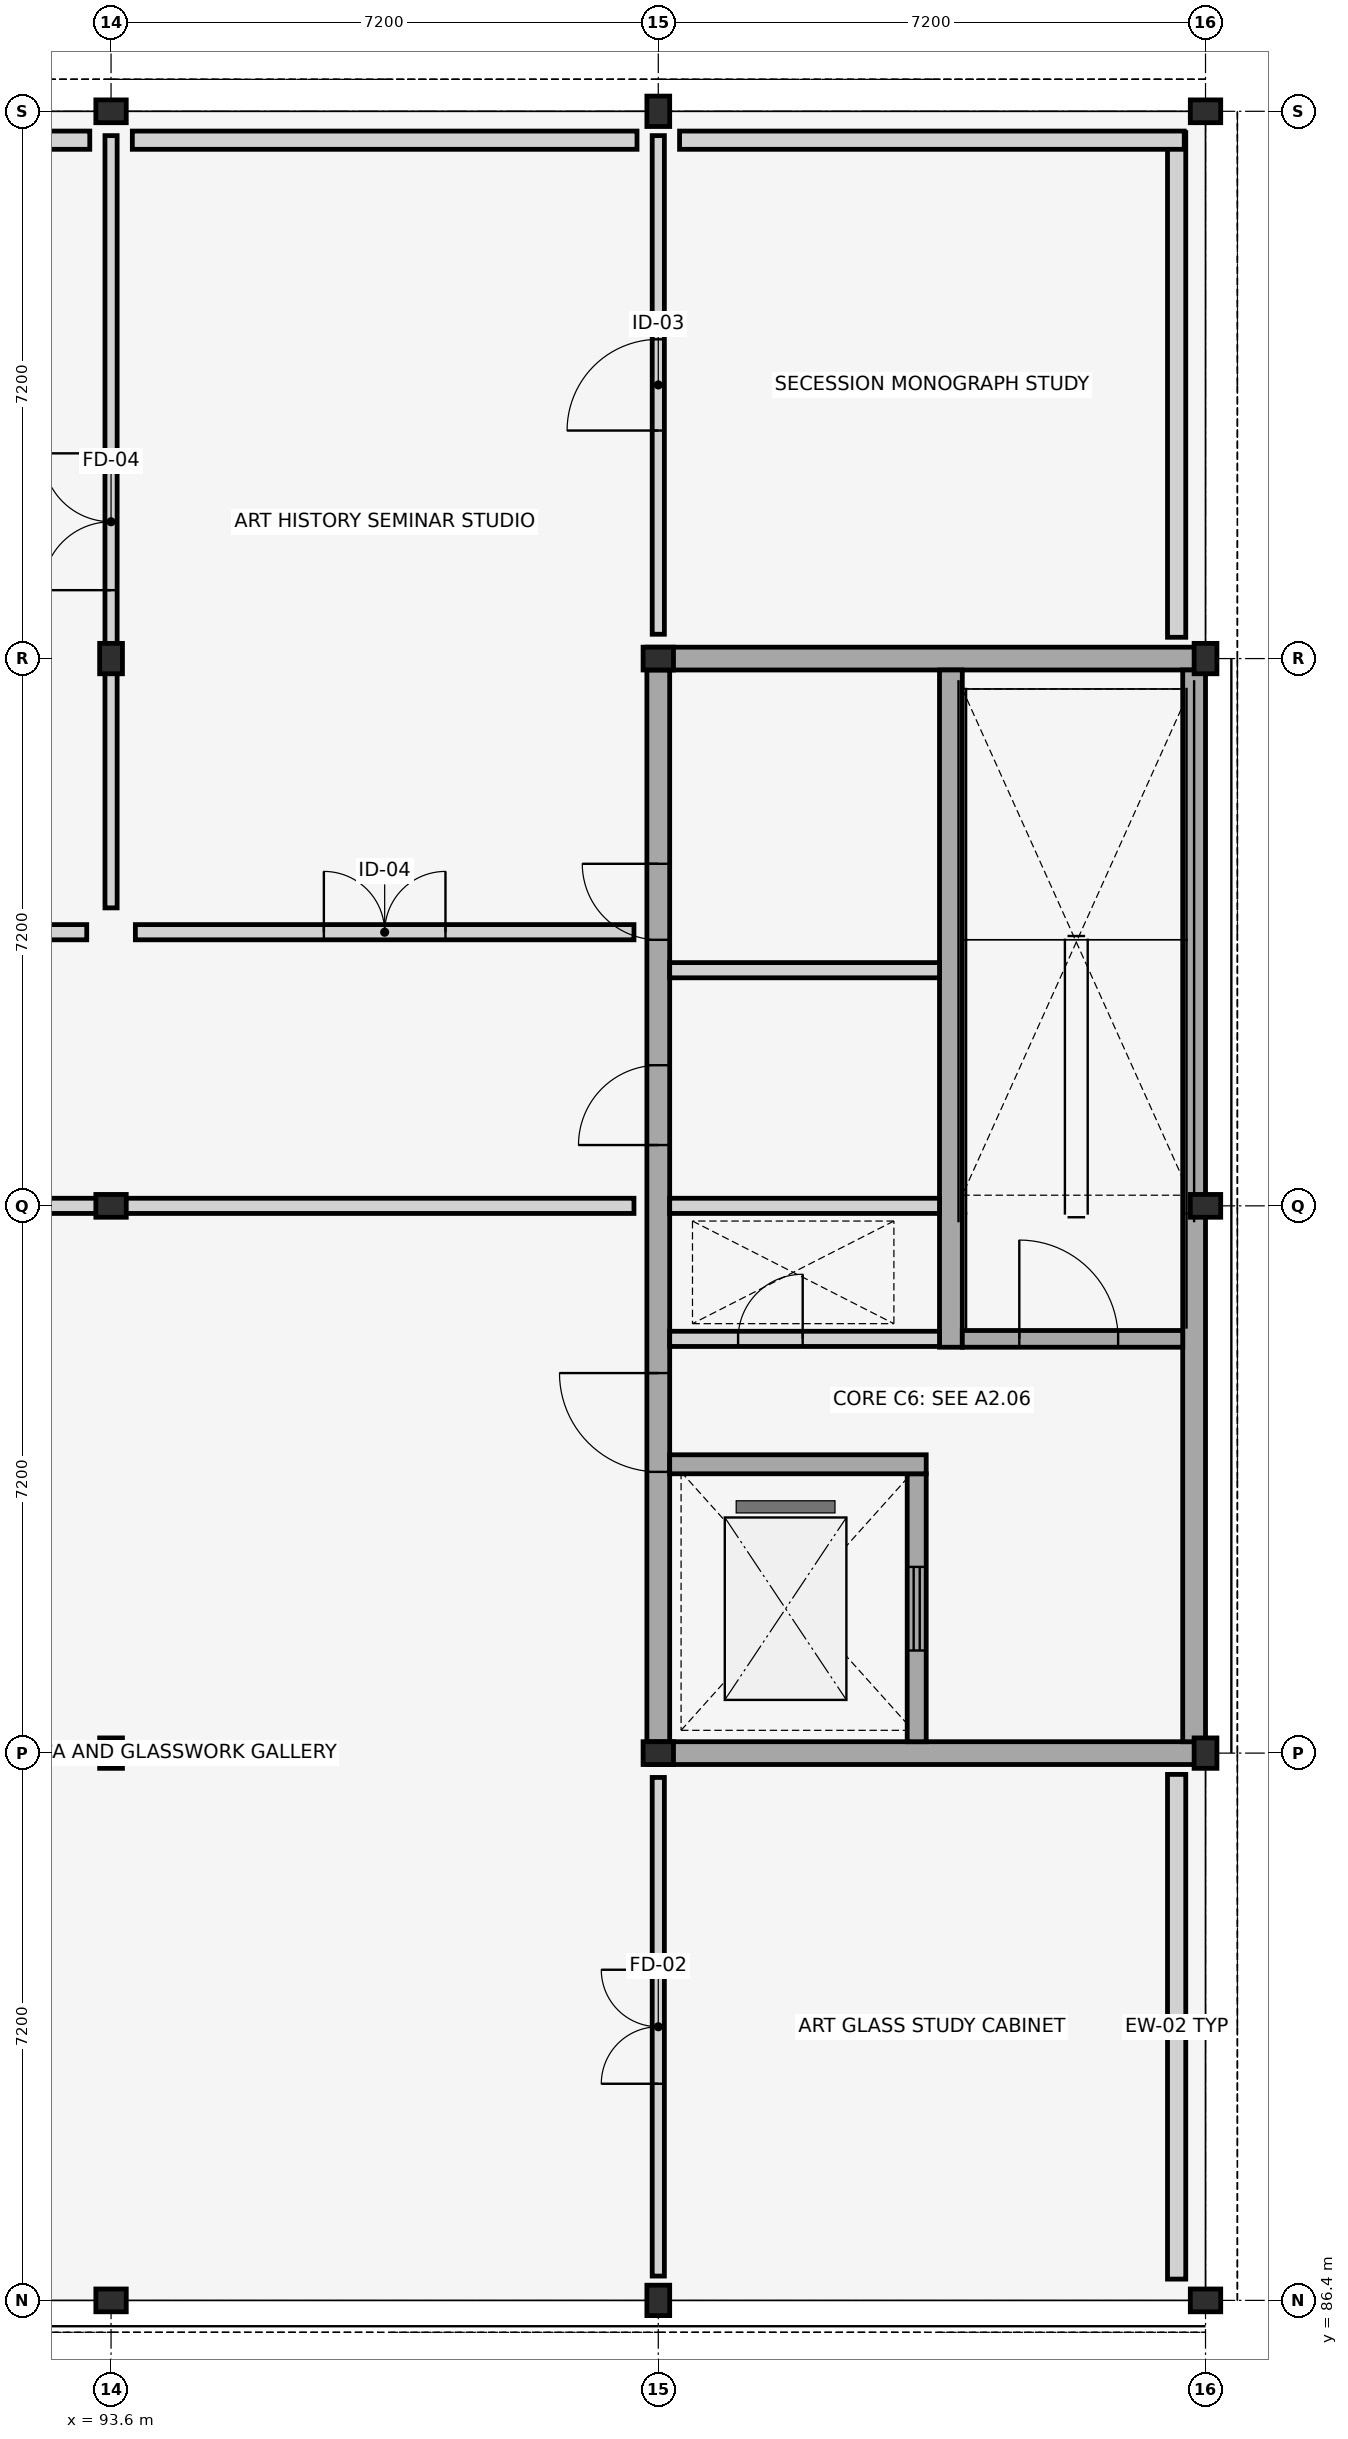
"""IFC4 building model, lengths in metres.
Left out: names, types, materials, properties, quantities, classifications, styles, units other than length and angle.
Written with IfcOpenShell. Run it as: python <this file> out.ifc"""

import sys

from ifc_helpers import new_model, si_unit, direction, frame, frame_2d, origin, origin_2d, place, context, subcontext, project, spatial, rectangle, i_section, extrude, element, fill, save


model = new_model("IFC4")
c1 = context("Model", 3, precision=1e-05, world=origin(), true_north=direction((0.0, 1.0)))
c2 = subcontext(c1, "Body", "Model", "MODEL_VIEW")
j1 = project(units=[si_unit("LENGTHUNIT", "METRE"), si_unit("PLANEANGLEUNIT", "RADIAN")], contexts=[c1])
p1 = place(None, origin())
s1 = spatial("IfcSite", under=j1, at=p1, CompositionType="ELEMENT")
p2 = place(p1, origin())
s2 = spatial("IfcBuilding", under=s1, at=p2, CompositionType="ELEMENT")
p3 = place(p2, frame((0.0, 0.0, 8.7)))
s3 = spatial("IfcBuildingStorey", under=s2, at=p3, CompositionType="ELEMENT", Elevation=8.7)
for number, where, z_axis, x_axis in (
    (1, (93.6, 86.4, 0.0), (0.0, 0.0, 1.0), (0.0, 1.0, 0.0)),
    (2, (93.6, 93.6, 0.0), (0.0, 0.0, 1.0), (1.0, 0.0, 0.0)),
    (3, (93.6, 100.8, 0.0), (0.0, 0.0, 1.0), (0.0, 1.0, 0.0)),
    (4, (93.6, 108.0, 0.0), (0.0, 0.0, 1.0), (1.0, 0.0, 0.0)),
    (5, (93.6, 115.2, 0.0), (0.0, 0.0, 1.0), (0.0, 1.0, 0.0)),
    (6, (100.8, 86.4, 0.0), (0.0, 0.0, 1.0), (1.0, 0.0, 0.0)),
    (7, (100.8, 93.6, 0.0), (0.0, 0.0, 1.0), (0.0, 1.0, 0.0)),
    (8, (100.8, 108.0, 0.0), (0.0, 0.0, 1.0), (0.0, 1.0, 0.0)),
    (9, (100.8, 115.2, 0.0), (0.0, 0.0, 1.0), (1.0, 0.0, 0.0)),
    (10, (108.0, 86.4, 0.0), (0.0, 0.0, 1.0), (0.0, 1.0, 0.0)),
    (11, (108.0, 93.6, 0.0), (0.0, 0.0, 1.0), (1.0, 0.0, 0.0)),
    (12, (108.0, 100.8, 0.0), (0.0, 0.0, 1.0), (0.0, 1.0, 0.0)),
    (13, (108.0, 108.0, 0.0), (0.0, 0.0, 1.0), (1.0, 0.0, 0.0)),
    (14, (108.0, 115.2, 0.0), (0.0, 0.0, 1.0), (0.0, 1.0, 0.0)),
):
    element("IfcColumn", number, at=place(p3, frame(where, z_axis=z_axis, x_axis=x_axis)), inside=s3, PredefinedType="COLUMN", context=c2, shape_type="SweptSolid", body=[
        extrude(i_section(OverallWidth=0.3, OverallDepth=0.4, WebThickness=0.013, FlangeThickness=0.024, FilletRadius=0.027, at=origin_2d()), origin(), (0.0, 0.0, 1.0), 4.2),
    ])
p4 = place(p3, frame((107.62, 86.68, 0.0), z_axis=(0.0, 0.0, 1.0), x_axis=(0.0, 1.0, 0.0)))
e15 = element("IfcWall", 15, at=p4, inside=s3, PredefinedType="STANDARD", context=c2, shape_type="SweptSolid", body=[
    extrude(rectangle(XDim=6.64, YDim=0.24, at=frame_2d((3.32, 0.0))), origin(), (0.0, 0.0, 1.0), 3.56),
])
for number, where, z_axis, x_axis in (
    (16, (107.62, 108.28, 0.0), (0.0, 0.0, 1.0), (0.0, 1.0, 0.0)),
    (17, (107.72, 114.82, 0.0), (0.0, 0.0, 1.0), (-1.0, 0.0, 0.0)),
):
    element("IfcWall", number, at=place(p3, frame(where, z_axis=z_axis, x_axis=x_axis)), inside=s3, PredefinedType="STANDARD", context=c2, shape_type="SweptSolid", body=[
        extrude(rectangle(XDim=6.64, YDim=0.24, at=frame_2d((3.32, 0.0))), origin(), (0.0, 0.0, 1.0), 3.56),
    ])
for number, where, z_axis, x_axis in (
    (18, (100.52, 114.82, 0.0), (0.0, 0.0, 1.0), (-1.0, 0.0, 0.0)),
    (19, (93.32, 114.82, 0.0), (0.0, 0.0, 1.0), (-1.0, 0.0, 0.0)),
):
    element("IfcWall", number, at=place(p3, frame(where, z_axis=z_axis, x_axis=x_axis)), inside=s3, PredefinedType="STANDARD", context=c2, shape_type="SweptSolid", body=[
        extrude(rectangle(XDim=6.64, YDim=0.24, at=frame_2d((3.32, 0.0))), origin(), (0.0, 0.0, 1.0), 3.56),
    ])
for number, where, z_axis, x_axis in (
    (20, (100.65, 93.6, 0.0), (0.0, 0.0, 1.0), (1.0, 0.0, 0.0)),
    (21, (100.65, 108.0, 0.0), (0.0, 0.0, 1.0), (1.0, 0.0, 0.0)),
):
    element("IfcWall", number, at=place(p3, frame(where, z_axis=z_axis, x_axis=x_axis)), inside=s3, PredefinedType="SHEAR", context=c2, shape_type="SweptSolid", body=[
        extrude(rectangle(XDim=7.35, YDim=0.3, at=frame_2d((3.675, 0.0))), origin(), (0.0, 0.0, 1.0), 3.96),
    ])
p5 = place(p3, frame((107.85, 93.75, 0.0), z_axis=(0.0, 0.0, 1.0), x_axis=(0.0, 1.0, 0.0)))
e22 = element("IfcWall", 22, at=p5, inside=s3, PredefinedType="SHEAR", context=c2, shape_type="SweptSolid", body=[
    extrude(rectangle(XDim=14.1, YDim=0.3, at=frame_2d((7.05, 0.0))), origin(), (0.0, 0.0, 1.0), 3.96),
])
p6 = place(p3, frame((100.8, 93.75, 0.0), z_axis=(0.0, 0.0, 1.0), x_axis=(0.0, 1.0, 0.0)))
e23 = element("IfcWall", 23, at=p6, inside=s3, PredefinedType="SHEAR", context=c2, shape_type="SweptSolid", body=[
    extrude(rectangle(XDim=14.1, YDim=0.3, at=frame_2d((7.05, 0.0))), origin(), (0.0, 0.0, 1.0), 3.96),
])
p7 = place(p6, frame((3.55, 0.0, 0.0)))
e24 = element("IfcOpeningElement", 24, at=p7, cuts=e23, PredefinedType="OPENING", context=c2, shape_type="SweptSolid", body=[
    extrude(rectangle(XDim=1.3, YDim=2.2, at=frame_2d((0.65, 1.1))), frame((0.0, 0.16, 0.0), z_axis=(0.0, -1.0, 0.0), x_axis=(1.0, 0.0, 0.0)), (0.0, 0.0, 1.0), 0.32),
])
p8 = place(p6, frame((7.85, 0.0, 0.0)))
e25 = element("IfcOpeningElement", 25, at=p8, cuts=e23, PredefinedType="OPENING", context=c2, shape_type="SweptSolid", body=[
    extrude(rectangle(XDim=1.05, YDim=2.15, at=frame_2d((0.525, 1.075))), frame((0.0, 0.16, 0.0), z_axis=(0.0, -1.0, 0.0), x_axis=(1.0, 0.0, 0.0)), (0.0, 0.0, 1.0), 0.32),
])
p9 = place(p6, frame((10.55, 0.0, 0.0)))
e26 = element("IfcOpeningElement", 26, at=p9, cuts=e23, PredefinedType="OPENING", context=c2, shape_type="SweptSolid", body=[
    extrude(rectangle(XDim=1.0, YDim=2.15, at=frame_2d((0.5, 1.075))), frame((0.0, 0.16, 0.0), z_axis=(0.0, -1.0, 0.0), x_axis=(1.0, 0.0, 0.0)), (0.0, 0.0, 1.0), 0.32),
])
p10 = place(p3, frame((104.2, 93.75, 0.0), z_axis=(0.0, 0.0, 1.0), x_axis=(0.0, 1.0, 0.0)))
e27 = element("IfcWall", 27, at=p10, inside=s3, PredefinedType="SHEAR", context=c2, shape_type="SweptSolid", body=[
    extrude(rectangle(XDim=3.525, YDim=0.25, at=frame_2d((1.762, 0.0))), origin(), (0.0, 0.0, 1.0), 3.96),
])
p11 = place(p10, frame((1.2, 0.0, 0.0)))
e28 = element("IfcOpeningElement", 28, at=p11, cuts=e27, PredefinedType="OPENING", context=c2, shape_type="SweptSolid", body=[
    extrude(rectangle(XDim=1.1, YDim=2.15, at=frame_2d((0.55, 1.075))), frame((0.0, 0.135, 0.0), z_axis=(0.0, -1.0, 0.0), x_axis=(1.0, 0.0, 0.0)), (0.0, 0.0, 1.0), 0.27),
])
p12 = place(p3, frame((104.65, 98.94, 0.0), z_axis=(0.0, 0.0, 1.0), x_axis=(0.0, 1.0, 0.0)))
e29 = element("IfcWall", 29, at=p12, inside=s3, PredefinedType="SHEAR", context=c2, shape_type="SweptSolid", body=[
    extrude(rectangle(XDim=8.91, YDim=0.3, at=frame_2d((4.455, 0.0))), origin(), (0.0, 0.0, 1.0), 3.96),
])
p13 = place(p3, frame((100.95, 99.05, 0.0), z_axis=(0.0, 0.0, 1.0), x_axis=(1.0, 0.0, 0.0)))
e30 = element("IfcWall", 30, at=p13, inside=s3, PredefinedType="PLUMBINGWALL", context=c2, shape_type="SweptSolid", body=[
    extrude(rectangle(XDim=3.55, YDim=0.2, at=frame_2d((1.775, 0.0))), origin(), (0.0, 0.0, 1.0), 3.38),
])
p14 = place(p13, frame((0.9, 0.0, 0.0)))
e31 = element("IfcOpeningElement", 31, at=p14, cuts=e30, PredefinedType="OPENING", context=c2, shape_type="SweptSolid", body=[
    extrude(rectangle(XDim=0.85, YDim=2.05, at=frame_2d((0.425, 1.025))), frame((0.0, 0.11, 0.0), z_axis=(0.0, -1.0, 0.0), x_axis=(1.0, 0.0, 0.0)), (0.0, 0.0, 1.0), 0.22),
])
p15 = place(p3, frame((104.8, 99.05, 0.0), z_axis=(0.0, 0.0, 1.0), x_axis=(1.0, 0.0, 0.0)))
e32 = element("IfcWall", 32, at=p15, inside=s3, PredefinedType="SHEAR", context=c2, shape_type="SweptSolid", body=[
    extrude(rectangle(XDim=2.9, YDim=0.22, at=frame_2d((1.45, 0.0))), origin(), (0.0, 0.0, 1.0), 3.96),
])
p16 = place(p15, frame((0.75, 0.0, 0.0)))
e33 = element("IfcOpeningElement", 33, at=p16, cuts=e32, PredefinedType="OPENING", context=c2, shape_type="SweptSolid", body=[
    extrude(rectangle(XDim=1.3, YDim=2.2, at=frame_2d((0.65, 1.1))), frame((0.0, 0.12, 0.0), z_axis=(0.0, -1.0, 0.0), x_axis=(1.0, 0.0, 0.0)), (0.0, 0.0, 1.0), 0.24),
])
p17 = place(p3, frame((100.95, 97.4, 0.0), z_axis=(0.0, 0.0, 1.0), x_axis=(1.0, 0.0, 0.0)))
e34 = element("IfcWall", 34, at=p17, inside=s3, PredefinedType="SHEAR", context=c2, shape_type="SweptSolid", body=[
    extrude(rectangle(XDim=3.375, YDim=0.25, at=frame_2d((1.688, 0.0))), origin(), (0.0, 0.0, 1.0), 3.96),
])
for number, where, z_axis, x_axis in (
    (35, (100.95, 100.8, 0.0), (0.0, 0.0, 1.0), (1.0, 0.0, 0.0)),
    (36, (100.95, 103.9, 0.0), (0.0, 0.0, 1.0), (1.0, 0.0, 0.0)),
):
    element("IfcWall", number, at=place(p3, frame(where, z_axis=z_axis, x_axis=x_axis)), inside=s3, PredefinedType="PLUMBINGWALL", context=c2, shape_type="SweptSolid", body=[
        extrude(rectangle(XDim=3.55, YDim=0.2, at=frame_2d((1.775, 0.0))), origin(), (0.0, 0.0, 1.0), 3.38),
    ])
p18 = place(p3, frame((86.72, 100.8, 0.0), z_axis=(0.0, 0.0, 1.0), x_axis=(1.0, 0.0, 0.0)))
e37 = element("IfcWall", 37, at=p18, inside=s3, PredefinedType="PARTITIONING", context=c2, shape_type="SweptSolid", body=[
    extrude(rectangle(XDim=13.76, YDim=0.2, at=frame_2d((6.88, 0.0))), origin(), (0.0, 0.0, 1.0), 3.15),
])
p19 = place(p18, frame((1.752, 0.0, 0.0)))
e38 = element("IfcOpeningElement", 38, at=p19, cuts=e37, PredefinedType="OPENING", context=c2, shape_type="SweptSolid", body=[
    extrude(rectangle(XDim=1.5, YDim=2.25, at=frame_2d((0.75, 1.125))), frame((0.0, 0.11, 0.0), z_axis=(0.0, -1.0, 0.0), x_axis=(1.0, 0.0, 0.0)), (0.0, 0.0, 1.0), 0.22),
])
p20 = place(p3, frame((65.12, 104.4, 0.0), z_axis=(0.0, 0.0, 1.0), x_axis=(1.0, 0.0, 0.0)))
e39 = element("IfcWall", 39, at=p20, inside=s3, PredefinedType="PARTITIONING", context=c2, shape_type="SweptSolid", body=[
    extrude(rectangle(XDim=28.16, YDim=0.2, at=frame_2d((14.08, 0.0))), origin(), (0.0, 0.0, 1.0), 3.15),
])
p21 = place(p20, frame((1.649, 0.0, 0.0)))
e40 = element("IfcOpeningElement", 40, at=p21, cuts=e39, PredefinedType="OPENING", context=c2, shape_type="SweptSolid", body=[
    extrude(rectangle(XDim=1.6, YDim=2.35, at=frame_2d((0.8, 1.175))), frame((0.0, 0.11, 0.0), z_axis=(0.0, -1.0, 0.0), x_axis=(1.0, 0.0, 0.0)), (0.0, 0.0, 1.0), 0.22),
])
p22 = place(p3, frame((93.92, 104.4, 0.0), z_axis=(0.0, 0.0, 1.0), x_axis=(1.0, 0.0, 0.0)))
e41 = element("IfcWall", 41, at=p22, inside=s3, PredefinedType="PARTITIONING", context=c2, shape_type="SweptSolid", body=[
    extrude(rectangle(XDim=6.56, YDim=0.2, at=frame_2d((3.28, 0.0))), origin(), (0.0, 0.0, 1.0), 3.15),
])
p23 = place(p22, frame((2.48, 0.0, 0.0)))
e42 = element("IfcOpeningElement", 42, at=p23, cuts=e41, PredefinedType="OPENING", context=c2, shape_type="SweptSolid", body=[
    extrude(rectangle(XDim=1.6, YDim=2.35, at=frame_2d((0.8, 1.175))), frame((0.0, 0.11, 0.0), z_axis=(0.0, -1.0, 0.0), x_axis=(1.0, 0.0, 0.0)), (0.0, 0.0, 1.0), 0.22),
])
p24 = place(p3, frame((100.8, 86.72, 0.0), z_axis=(0.0, 0.0, 1.0), x_axis=(0.0, 1.0, 0.0)))
e43 = element("IfcWall", 43, at=p24, inside=s3, PredefinedType="PARTITIONING", context=c2, shape_type="SweptSolid", body=[
    extrude(rectangle(XDim=6.56, YDim=0.16, at=frame_2d((3.28, 0.0))), origin(), (0.0, 0.0, 1.0), 3.15),
])
p25 = place(p24, frame((2.53, 0.0, 0.0)))
e44 = element("IfcOpeningElement", 44, at=p25, cuts=e43, PredefinedType="OPENING", context=c2, shape_type="SweptSolid", body=[
    extrude(rectangle(XDim=1.5, YDim=2.25, at=frame_2d((0.75, 1.125))), frame((0.0, 0.09, 0.0), z_axis=(0.0, -1.0, 0.0), x_axis=(1.0, 0.0, 0.0)), (0.0, 0.0, 1.0), 0.18),
])
p26 = place(p3, frame((93.6, 104.72, 0.0), z_axis=(0.0, 0.0, 1.0), x_axis=(0.0, 1.0, 0.0)))
e45 = element("IfcWall", 45, at=p26, inside=s3, PredefinedType="PARTITIONING", context=c2, shape_type="SweptSolid", body=[
    extrude(rectangle(XDim=10.16, YDim=0.16, at=frame_2d((5.08, 0.0))), origin(), (0.0, 0.0, 1.0), 3.15),
])
p27 = place(p26, frame((4.18, 0.0, 0.0)))
e46 = element("IfcOpeningElement", 46, at=p27, cuts=e45, PredefinedType="OPENING", context=c2, shape_type="SweptSolid", body=[
    extrude(rectangle(XDim=1.8, YDim=2.4, at=frame_2d((0.9, 1.2))), frame((0.0, 0.09, 0.0), z_axis=(0.0, -1.0, 0.0), x_axis=(1.0, 0.0, 0.0)), (0.0, 0.0, 1.0), 0.18),
])
p28 = place(p3, frame((100.8, 108.32, 0.0), z_axis=(0.0, 0.0, 1.0), x_axis=(0.0, 1.0, 0.0)))
e47 = element("IfcWall", 47, at=p28, inside=s3, PredefinedType="PARTITIONING", context=c2, shape_type="SweptSolid", body=[
    extrude(rectangle(XDim=6.56, YDim=0.16, at=frame_2d((3.28, 0.0))), origin(), (0.0, 0.0, 1.0), 3.15),
])
p29 = place(p28, frame((2.68, 0.0, 0.0)))
e48 = element("IfcOpeningElement", 48, at=p29, cuts=e47, PredefinedType="OPENING", context=c2, shape_type="SweptSolid", body=[
    extrude(rectangle(XDim=1.2, YDim=2.25, at=frame_2d((0.6, 1.125))), frame((0.0, 0.09, 0.0), z_axis=(0.0, -1.0, 0.0), x_axis=(1.0, 0.0, 0.0)), (0.0, 0.0, 1.0), 0.18),
])
p30 = place(p7, origin())
e49 = element("IfcDoor", 49, at=p30, inside=s3, OperationType="SINGLE_SWING_RIGHT", PredefinedType="DOOR", context=c2, shape_type="SweptSolid", body=[
    extrude(rectangle(XDim=1.3, YDim=2.2, at=frame_2d((0.65, 1.1))), frame((0.0, 0.025, 0.0), z_axis=(0.0, -1.0, 0.0), x_axis=(1.0, 0.0, 0.0)), (0.0, 0.0, 1.0), 0.05),
])
fill(e24, e49)
p31 = place(p8, origin())
e50 = element("IfcDoor", 50, at=p31, inside=s3, OperationType="SINGLE_SWING_LEFT", PredefinedType="DOOR", context=c2, shape_type="SweptSolid", body=[
    extrude(rectangle(XDim=1.05, YDim=2.15, at=frame_2d((0.525, 1.075))), frame((0.0, 0.025, 0.0), z_axis=(0.0, -1.0, 0.0), x_axis=(1.0, 0.0, 0.0)), (0.0, 0.0, 1.0), 0.05),
])
fill(e25, e50)
p32 = place(p9, origin())
e51 = element("IfcDoor", 51, at=p32, inside=s3, OperationType="SINGLE_SWING_RIGHT", PredefinedType="DOOR", context=c2, shape_type="SweptSolid", body=[
    extrude(rectangle(XDim=1.0, YDim=2.15, at=frame_2d((0.5, 1.075))), frame((0.0, 0.025, 0.0), z_axis=(0.0, -1.0, 0.0), x_axis=(1.0, 0.0, 0.0)), (0.0, 0.0, 1.0), 0.05),
])
fill(e26, e51)
p33 = place(p11, origin())
e52 = element("IfcDoor", 52, at=p33, inside=s3, OperationType="SLIDING_TO_LEFT", PredefinedType="DOOR", context=c2, shape_type="SweptSolid", body=[
    extrude(rectangle(XDim=1.1, YDim=2.15, at=frame_2d((0.55, 1.075))), frame((0.0, 0.025, 0.0), z_axis=(0.0, -1.0, 0.0), x_axis=(1.0, 0.0, 0.0)), (0.0, 0.0, 1.0), 0.05),
])
fill(e28, e52)
p34 = place(p14, origin())
e53 = element("IfcDoor", 53, at=p34, inside=s3, OperationType="SINGLE_SWING_RIGHT", PredefinedType="TRAPDOOR", context=c2, shape_type="SweptSolid", body=[
    extrude(rectangle(XDim=0.85, YDim=2.05, at=frame_2d((0.425, 1.025))), frame((0.0, 0.025, 0.0), z_axis=(0.0, -1.0, 0.0), x_axis=(1.0, 0.0, 0.0)), (0.0, 0.0, 1.0), 0.05),
])
fill(e31, e53)
p35 = place(p16, origin())
e54 = element("IfcDoor", 54, at=p35, inside=s3, OperationType="SINGLE_SWING_LEFT", PredefinedType="DOOR", context=c2, shape_type="SweptSolid", body=[
    extrude(rectangle(XDim=1.3, YDim=2.2, at=frame_2d((0.65, 1.1))), frame((0.0, 0.025, 0.0), z_axis=(0.0, -1.0, 0.0), x_axis=(1.0, 0.0, 0.0)), (0.0, 0.0, 1.0), 0.05),
])
fill(e33, e54)
p36 = place(p23, origin())
e55 = element("IfcDoor", 55, at=p36, inside=s3, OperationType="DOUBLE_DOOR_SINGLE_SWING", PredefinedType="DOOR", context=c2, shape_type="SweptSolid", body=[
    extrude(rectangle(XDim=1.6, YDim=2.35, at=frame_2d((0.8, 1.175))), frame((0.0, 0.025, 0.0), z_axis=(0.0, -1.0, 0.0), x_axis=(1.0, 0.0, 0.0)), (0.0, 0.0, 1.0), 0.05),
])
fill(e42, e55)
p37 = place(p25, origin())
e56 = element("IfcDoor", 56, at=p37, inside=s3, OperationType="DOUBLE_DOOR_SINGLE_SWING", PredefinedType="DOOR", context=c2, shape_type="SweptSolid", body=[
    extrude(rectangle(XDim=1.5, YDim=2.25, at=frame_2d((0.75, 1.125))), frame((0.0, 0.025, 0.0), z_axis=(0.0, -1.0, 0.0), x_axis=(1.0, 0.0, 0.0)), (0.0, 0.0, 1.0), 0.05),
])
fill(e44, e56)
p38 = place(p27, origin())
e57 = element("IfcDoor", 57, at=p38, inside=s3, OperationType="DOUBLE_DOOR_SINGLE_SWING", PredefinedType="DOOR", context=c2, shape_type="SweptSolid", body=[
    extrude(rectangle(XDim=1.8, YDim=2.4, at=frame_2d((0.9, 1.2))), frame((0.0, 0.025, 0.0), z_axis=(0.0, -1.0, 0.0), x_axis=(1.0, 0.0, 0.0)), (0.0, 0.0, 1.0), 0.05),
])
fill(e46, e57)
p39 = place(p29, origin())
e58 = element("IfcDoor", 58, at=p39, inside=s3, OperationType="SINGLE_SWING_LEFT", PredefinedType="DOOR", context=c2, shape_type="SweptSolid", body=[
    extrude(rectangle(XDim=1.2, YDim=2.25, at=frame_2d((0.6, 1.125))), frame((0.0, 0.025, 0.0), z_axis=(0.0, -1.0, 0.0), x_axis=(1.0, 0.0, 0.0)), (0.0, 0.0, 1.0), 0.05),
])
fill(e48, e58)
save(model, sys.argv[1])
